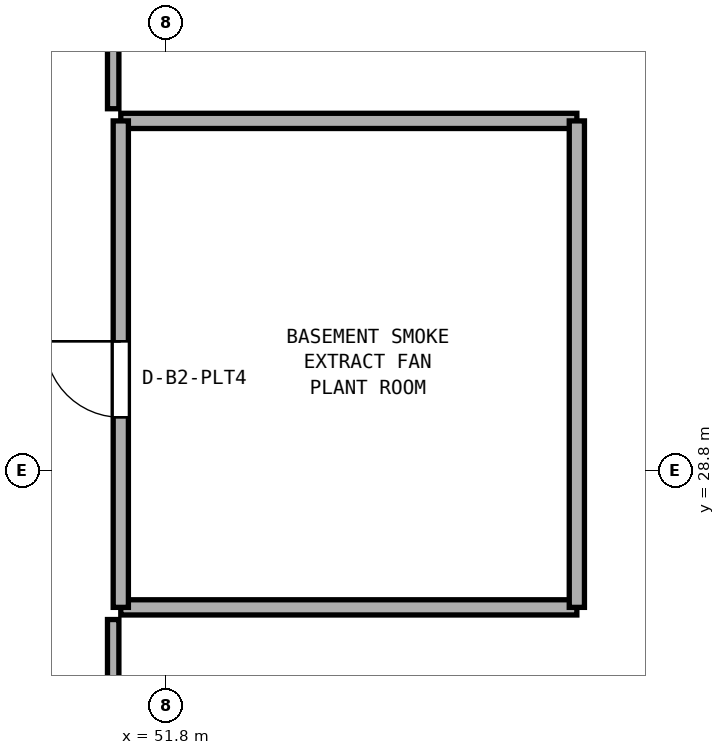
"""IFC4 building model, lengths in metres.
Left out: names, types, materials, properties, quantities, classifications, styles, units other than length and angle.
Written with IfcOpenShell. Run it as: python <this file> out.ifc"""

import sys

from ifc_helpers import new_model, si_unit, direction, frame, frame_2d, origin, place, context, subcontext, project, spatial, rectangle, extrude, element, fill, save


model = new_model("IFC4")
c1 = context("Model", 3, precision=1e-05, world=origin(), true_north=direction((0.0, 1.0)))
c2 = subcontext(c1, "Body", "Model", "MODEL_VIEW")
j1 = project(units=[si_unit("LENGTHUNIT", "METRE"), si_unit("PLANEANGLEUNIT", "RADIAN")], contexts=[c1])
p1 = place(None, origin())
s1 = spatial("IfcSite", under=j1, at=p1, CompositionType="ELEMENT")
p2 = place(p1, origin())
s2 = spatial("IfcBuilding", under=s1, at=p2, CompositionType="ELEMENT")
p3 = place(p2, frame((0.0, 0.0, -9.6)))
s3 = spatial("IfcBuildingStorey", under=s2, at=p3, CompositionType="ELEMENT", Elevation=-9.6)
p4 = place(p3, frame((51.2, 27.0, 0.0), z_axis=(0.0, 0.0, 1.0), x_axis=(1.0, 0.0, 0.0)))
e1 = element("IfcWall", 1, at=p4, inside=s3, PredefinedType="SOLIDWALL", context=c2, shape_type="SweptSolid", body=[
    extrude(rectangle(XDim=6.0, YDim=0.2, at=frame_2d((3.0, 0.0))), origin(), (0.0, 0.0, 1.0), 3.55),
])
p5 = place(p3, frame((51.2, 33.4, 0.0), z_axis=(0.0, 0.0, 1.0), x_axis=(1.0, 0.0, 0.0)))
e2 = element("IfcWall", 2, at=p5, inside=s3, PredefinedType="SOLIDWALL", context=c2, shape_type="SweptSolid", body=[
    extrude(rectangle(XDim=6.0, YDim=0.2, at=frame_2d((3.0, 0.0))), origin(), (0.0, 0.0, 1.0), 4.45),
])
p6 = place(p3, frame((51.2, 27.0, 0.0), z_axis=(0.0, 0.0, 1.0), x_axis=(0.0, 1.0, 0.0)))
e3 = element("IfcWall", 3, at=p6, inside=s3, PredefinedType="SOLIDWALL", context=c2, shape_type="SweptSolid", body=[
    extrude(rectangle(XDim=6.4, YDim=0.2, at=frame_2d((3.2, 0.0))), origin(), (0.0, 0.0, 1.0), 4.45),
])
p7 = place(p6, frame((2.5, 0.0, 0.0)))
e4 = element("IfcOpeningElement", 4, at=p7, cuts=e3, PredefinedType="OPENING", context=c2, shape_type="SweptSolid", body=[
    extrude(rectangle(XDim=1.0, YDim=2.12, at=frame_2d((0.5, 1.06))), frame((0.0, 0.11, 0.0), z_axis=(0.0, -1.0, 0.0), x_axis=(1.0, 0.0, 0.0)), (0.0, 0.0, 1.0), 0.22),
])
p8 = place(p3, frame((57.2, 27.0, 0.0), z_axis=(0.0, 0.0, 1.0), x_axis=(0.0, 1.0, 0.0)))
e5 = element("IfcWall", 5, at=p8, inside=s3, PredefinedType="SOLIDWALL", context=c2, shape_type="SweptSolid", body=[
    extrude(rectangle(XDim=6.4, YDim=0.2, at=frame_2d((3.2, 0.0))), origin(), (0.0, 0.0, 1.0), 4.45),
])
p9 = place(p3, frame((51.1, 23.56, 0.0), z_axis=(0.0, 0.0, 1.0), x_axis=(0.0, 1.0, 0.0)))
e6 = element("IfcWall", 6, at=p9, inside=s3, PredefinedType="PARTITIONING", context=c2, shape_type="SweptSolid", body=[
    extrude(rectangle(XDim=3.28, YDim=0.15, at=frame_2d((1.64, 0.0))), origin(), (0.0, 0.0, 1.0), 4.45),
])
p10 = place(p3, frame((51.1, 33.56, 0.0), z_axis=(0.0, 0.0, 1.0), x_axis=(0.0, 1.0, 0.0)))
e7 = element("IfcWall", 7, at=p10, inside=s3, PredefinedType="PARTITIONING", context=c2, shape_type="SweptSolid", body=[
    extrude(rectangle(XDim=3.94, YDim=0.15, at=frame_2d((1.97, 0.0))), origin(), (0.0, 0.0, 1.0), 4.45),
])
p11 = place(p7, origin())
e8 = element("IfcDoor", 8, at=p11, inside=s3, OperationType="SINGLE_SWING_RIGHT", PredefinedType="DOOR", context=c2, shape_type="SweptSolid", body=[
    extrude(rectangle(XDim=1.0, YDim=2.12, at=frame_2d((0.5, 1.06))), frame((0.0, 0.025, 0.0), z_axis=(0.0, -1.0, 0.0), x_axis=(1.0, 0.0, 0.0)), (0.0, 0.0, 1.0), 0.05),
])
fill(e4, e8)
save(model, sys.argv[1])
